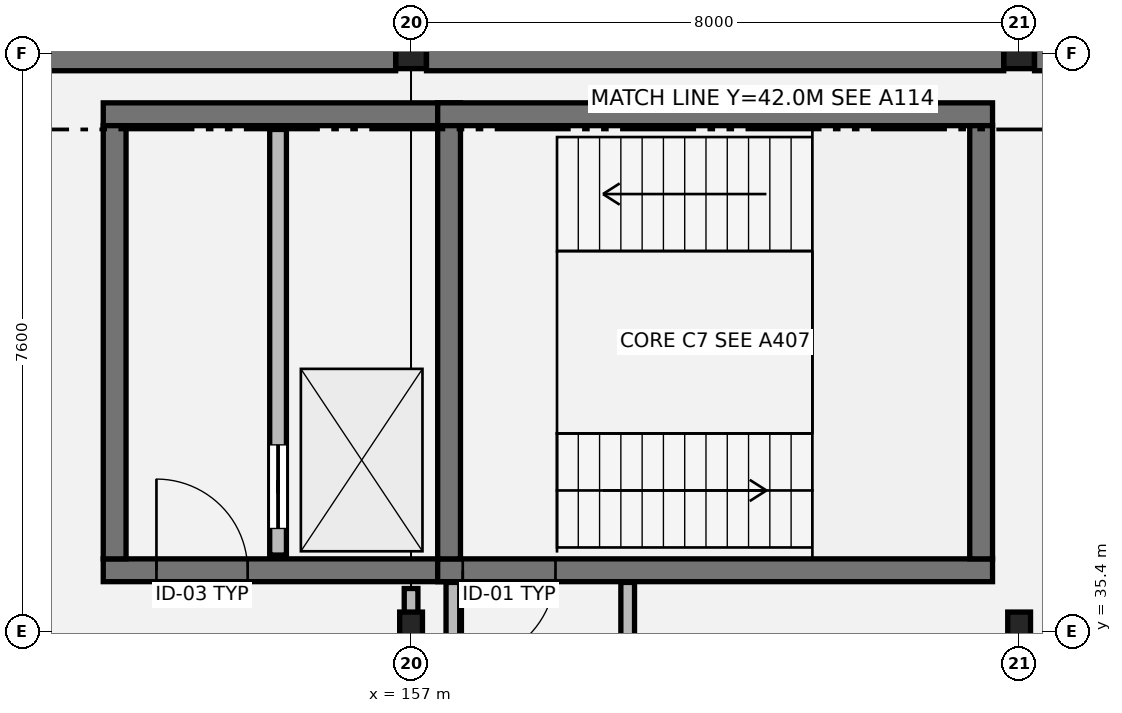
"""IFC4 building model, lengths in metres.
Left out: names, types, materials, properties, quantities, classifications, styles, units other than length and angle.
Written with IfcOpenShell. Run it as: python <this file> out.ifc"""

import sys

from ifc_helpers import new_model, si_unit, direction, frame, frame_2d, origin, origin_2d, place, context, subcontext, project, spatial, rectangle, hollow_rectangle, i_section, extrude, element, fill, save


model = new_model("IFC4")
c1 = context("Model", 3, precision=1e-05, world=origin(), true_north=direction((0.0, 1.0)))
c2 = subcontext(c1, "Body", "Model", "MODEL_VIEW")
j1 = project(units=[si_unit("LENGTHUNIT", "METRE"), si_unit("PLANEANGLEUNIT", "RADIAN")], contexts=[c1])
p1 = place(None, origin())
s1 = spatial("IfcSite", under=j1, at=p1, CompositionType="ELEMENT")
p2 = place(p1, origin())
s2 = spatial("IfcBuilding", under=s1, at=p2, CompositionType="ELEMENT")
p3 = place(p2, frame((0.0, 0.0, -4.42)))
s3 = spatial("IfcBuildingStorey", under=s2, at=p3, CompositionType="ELEMENT", Elevation=-4.42)
p4 = place(p3, frame((157.0, 35.4, 0.0), z_axis=(0.0, 0.0, 1.0), x_axis=(1.0, 0.0, 0.0)))
e1 = element("IfcColumn", 1, at=p4, inside=s3, PredefinedType="COLUMN", context=c2, shape_type="SweptSolid", body=[
    extrude(i_section(OverallWidth=0.3, OverallDepth=0.5, WebThickness=0.014, FlangeThickness=0.028, at=origin_2d()), origin(), (0.0, 0.0, 1.0), 4.395),
])
p5 = place(p3, frame((157.0, 43.0, 0.0), z_axis=(0.0, 0.0, 1.0), x_axis=(1.0, 0.0, 0.0)))
e2 = element("IfcColumn", 2, at=p5, inside=s3, PredefinedType="COLUMN", context=c2, shape_type="SweptSolid", body=[
    extrude(hollow_rectangle(XDim=0.4, YDim=0.4, WallThickness=0.016, at=origin_2d()), origin(), (0.0, 0.0, 1.0), 4.395),
])
p6 = place(p3, frame((165.0, 35.4, 0.0), z_axis=(0.0, 0.0, 1.0), x_axis=(1.0, 0.0, 0.0)))
e3 = element("IfcColumn", 3, at=p6, inside=s3, PredefinedType="COLUMN", context=c2, shape_type="SweptSolid", body=[
    extrude(i_section(OverallWidth=0.3, OverallDepth=0.5, WebThickness=0.014, FlangeThickness=0.028, at=origin_2d()), origin(), (0.0, 0.0, 1.0), 4.395),
])
p7 = place(p3, frame((165.0, 43.0, 0.0), z_axis=(0.0, 0.0, 1.0), x_axis=(1.0, 0.0, 0.0)))
e4 = element("IfcColumn", 4, at=p7, inside=s3, PredefinedType="COLUMN", context=c2, shape_type="SweptSolid", body=[
    extrude(hollow_rectangle(XDim=0.4, YDim=0.4, WallThickness=0.016, at=origin_2d()), origin(), (0.0, 0.0, 1.0), 4.395),
])
for number, where, z_axis, x_axis in (
    (5, (149.203, 43.0, 0.0), (0.0, 0.0, 1.0), (1.0, 0.0, 0.0)),
    (6, (157.203, 43.0, 0.0), (0.0, 0.0, 1.0), (1.0, 0.0, 0.0)),
    (7, (165.203, 43.0, 0.0), (0.0, 0.0, 1.0), (1.0, 0.0, 0.0)),
):
    element("IfcWall", number, at=place(p3, frame(where, z_axis=z_axis, x_axis=x_axis)), inside=s3, PredefinedType="USERDEFINED", context=c2, shape_type="SweptSolid", body=[
        extrude(rectangle(XDim=7.594, YDim=0.455, at=frame_2d((3.797, 0.0))), origin(), (0.0, 0.0, 1.0), 3.82),
    ])
p8 = place(p3, frame((152.95, 36.2, 0.0), z_axis=(0.0, 0.0, 1.0), x_axis=(1.0, 0.0, 0.0)))
e8 = element("IfcWall", 8, at=p8, inside=s3, PredefinedType="SHEAR", context=c2, shape_type="SweptSolid", body=[
    extrude(rectangle(XDim=4.7, YDim=0.3, at=frame_2d((2.35, 0.0))), origin(), (0.0, 0.0, 1.0), 4.185),
])
p9 = place(p8, frame((0.7, 0.0, 0.0)))
e9 = element("IfcOpeningElement", 9, at=p9, cuts=e8, PredefinedType="OPENING", context=c2, shape_type="SweptSolid", body=[
    extrude(rectangle(XDim=1.2, YDim=2.16, at=frame_2d((0.6, 1.08))), frame((0.0, 0.16, 0.0), z_axis=(0.0, -1.0, 0.0), x_axis=(1.0, 0.0, 0.0)), (0.0, 0.0, 1.0), 0.32),
])
p10 = place(p3, frame((157.65, 42.2, 0.0), z_axis=(0.0, 0.0, 1.0), x_axis=(-1.0, 0.0, 0.0)))
e10 = element("IfcWall", 10, at=p10, inside=s3, PredefinedType="SHEAR", context=c2, shape_type="SweptSolid", body=[
    extrude(rectangle(XDim=4.7, YDim=0.3, at=frame_2d((2.35, 0.0))), origin(), (0.0, 0.0, 1.0), 4.185),
])
p11 = place(p3, frame((153.1, 42.05, 0.0), z_axis=(0.0, 0.0, 1.0), x_axis=(0.0, -1.0, 0.0)))
e11 = element("IfcWall", 11, at=p11, inside=s3, PredefinedType="SHEAR", context=c2, shape_type="SweptSolid", body=[
    extrude(rectangle(XDim=5.7, YDim=0.3, at=frame_2d((2.85, 0.0))), origin(), (0.0, 0.0, 1.0), 4.185),
])
p12 = place(p3, frame((155.25, 36.4, 0.0), z_axis=(0.0, 0.0, 1.0), x_axis=(0.0, 1.0, 0.0)))
e12 = element("IfcWall", 12, at=p12, inside=s3, PredefinedType="SOLIDWALL", context=c2, shape_type="SweptSolid", body=[
    extrude(rectangle(XDim=5.6, YDim=0.22, at=frame_2d((2.8, 0.0))), origin(), (0.0, 0.0, 1.0), 4.185),
])
p13 = place(p12, frame((0.35, 0.0, 0.0)))
e13 = element("IfcOpeningElement", 13, at=p13, cuts=e12, PredefinedType="OPENING", context=c2, shape_type="SweptSolid", body=[
    extrude(rectangle(XDim=1.1, YDim=2.15, at=frame_2d((0.55, 1.075))), frame((0.0, 0.12, 0.0), z_axis=(0.0, -1.0, 0.0), x_axis=(1.0, 0.0, 0.0)), (0.0, 0.0, 1.0), 0.24),
])
p14 = place(p3, frame((157.35, 36.2, 0.0), z_axis=(0.0, 0.0, 1.0), x_axis=(1.0, 0.0, 0.0)))
e14 = element("IfcWall", 14, at=p14, inside=s3, PredefinedType="SHEAR", context=c2, shape_type="SweptSolid", body=[
    extrude(rectangle(XDim=7.3, YDim=0.3, at=frame_2d((3.65, 0.0))), origin(), (0.0, 0.0, 1.0), 4.185),
])
p15 = place(p14, frame((0.33, 0.0, 0.0)))
e15 = element("IfcOpeningElement", 15, at=p15, cuts=e14, PredefinedType="OPENING", context=c2, shape_type="SweptSolid", body=[
    extrude(rectangle(XDim=1.22, YDim=2.18, at=frame_2d((0.61, 1.09))), frame((0.0, 0.16, 0.0), z_axis=(0.0, -1.0, 0.0), x_axis=(1.0, 0.0, 0.0)), (0.0, 0.0, 1.0), 0.32),
])
p16 = place(p3, frame((157.35, 42.2, 0.0), z_axis=(0.0, 0.0, 1.0), x_axis=(1.0, 0.0, 0.0)))
e16 = element("IfcWall", 16, at=p16, inside=s3, PredefinedType="SHEAR", context=c2, shape_type="SweptSolid", body=[
    extrude(rectangle(XDim=7.3, YDim=0.3, at=frame_2d((3.65, 0.0))), origin(), (0.0, 0.0, 1.0), 4.185),
])
for number, where, z_axis, x_axis in (
    (17, (157.5, 36.35, 0.0), (0.0, 0.0, 1.0), (0.0, 1.0, 0.0)),
    (18, (164.5, 36.35, 0.0), (0.0, 0.0, 1.0), (0.0, 1.0, 0.0)),
):
    element("IfcWall", number, at=place(p3, frame(where, z_axis=z_axis, x_axis=x_axis)), inside=s3, PredefinedType="SHEAR", context=c2, shape_type="SweptSolid", body=[
        extrude(rectangle(XDim=5.7, YDim=0.3, at=frame_2d((2.85, 0.0))), origin(), (0.0, 0.0, 1.0), 4.185),
    ])
p17 = place(p3, frame((157.0, 35.64, 0.0), z_axis=(0.0, 0.0, 1.0), x_axis=(0.0, 1.0, 0.0)))
e19 = element("IfcWall", 19, at=p17, inside=s3, PredefinedType="PARTITIONING", context=c2, shape_type="SweptSolid", body=[
    extrude(rectangle(XDim=0.32, YDim=0.18, at=frame_2d((0.16, 0.0))), origin(), (0.0, 0.0, 1.0), 3.52),
])
for number, where, z_axis, x_axis in (
    (20, (157.55, 11.96, 0.0), (0.0, 0.0, 1.0), (0.0, 1.0, 0.0)),
    (21, (159.85, 11.96, 0.0), (0.0, 0.0, 1.0), (0.0, 1.0, 0.0)),
):
    element("IfcWall", number, at=place(p3, frame(where, z_axis=z_axis, x_axis=x_axis)), inside=s3, PredefinedType="PARTITIONING", context=c2, shape_type="SweptSolid", body=[
        extrude(rectangle(XDim=24.08, YDim=0.18, at=frame_2d((12.04, 0.0))), origin(), (0.0, 0.0, 1.0), 3.52),
    ])
p18 = place(p9, origin())
e22 = element("IfcDoor", 22, at=p18, inside=s3, OperationType="SINGLE_SWING_LEFT", PredefinedType="DOOR", context=c2, shape_type="SweptSolid", body=[
    extrude(rectangle(XDim=1.2, YDim=2.16, at=frame_2d((0.6, 1.08))), frame((0.0, 0.025, 0.0), z_axis=(0.0, -1.0, 0.0), x_axis=(1.0, 0.0, 0.0)), (0.0, 0.0, 1.0), 0.05),
])
fill(e9, e22)
p19 = place(p13, origin())
e23 = element("IfcDoor", 23, at=p19, inside=s3, OperationType="SLIDING_TO_LEFT", PredefinedType="DOOR", context=c2, shape_type="SweptSolid", body=[
    extrude(rectangle(XDim=1.1, YDim=2.15, at=frame_2d((0.55, 1.075))), frame((0.0, 0.025, 0.0), z_axis=(0.0, -1.0, 0.0), x_axis=(1.0, 0.0, 0.0)), (0.0, 0.0, 1.0), 0.05),
])
fill(e13, e23)
p20 = place(p15, origin())
e24 = element("IfcDoor", 24, at=p20, inside=s3, OperationType="SINGLE_SWING_RIGHT", PredefinedType="DOOR", context=c2, shape_type="SweptSolid", body=[
    extrude(rectangle(XDim=1.22, YDim=2.18, at=frame_2d((0.61, 1.09))), frame((0.0, 0.025, 0.0), z_axis=(0.0, -1.0, 0.0), x_axis=(1.0, 0.0, 0.0)), (0.0, 0.0, 1.0), 0.05),
])
fill(e15, e24)
save(model, sys.argv[1])
